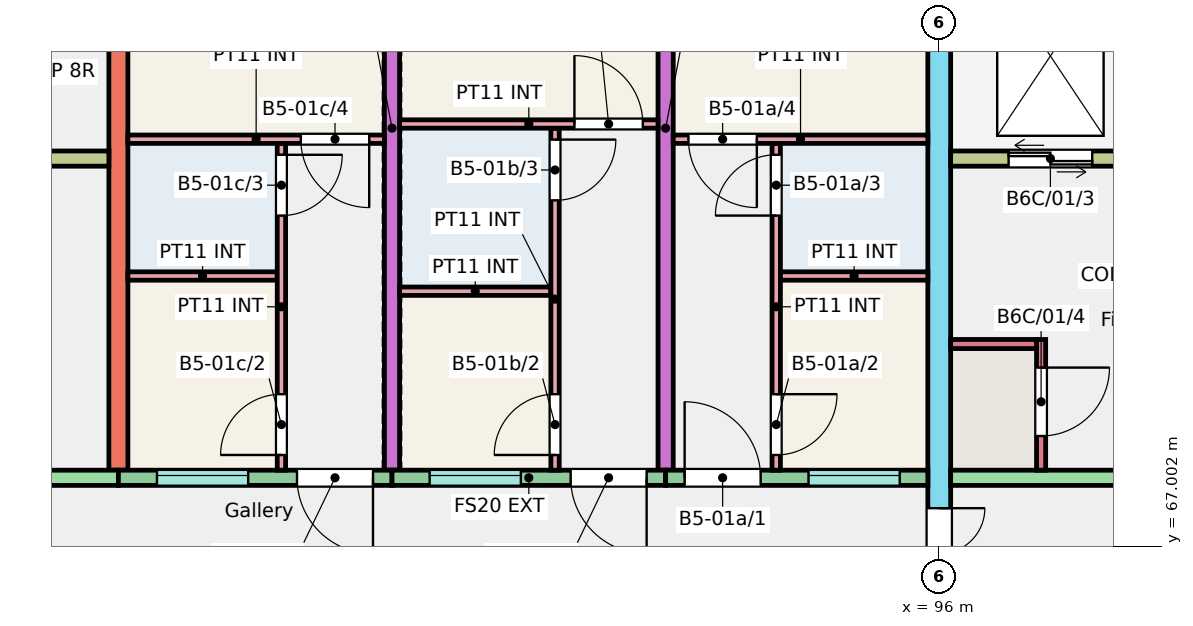
"""IFC4 building model, lengths in metres.
Left out: names, types, materials, properties, quantities, classifications, styles, units other than length and angle.
Written with IfcOpenShell. Run it as: python <this file> out.ifc"""

import sys

from ifc_helpers import new_model, si_unit, direction, frame, frame_2d, origin, place, context, subcontext, project, spatial, rectangle, extrude, element, fill, save


model = new_model("IFC4")
c1 = context("Model", 3, precision=1e-05, world=origin(), true_north=direction((0.0, 1.0)))
c2 = subcontext(c1, "Body", "Model", "MODEL_VIEW")
j1 = project(units=[si_unit("LENGTHUNIT", "METRE"), si_unit("PLANEANGLEUNIT", "RADIAN")], contexts=[c1])
p1 = place(None, origin())
s1 = spatial("IfcSite", under=j1, at=p1, CompositionType="ELEMENT")
p2 = place(p1, origin())
s2 = spatial("IfcBuilding", under=s1, at=p2, CompositionType="ELEMENT")
p3 = place(p2, frame((0.0, 0.0, 3.0)))
s3 = spatial("IfcBuildingStorey", under=s2, at=p3, CompositionType="ELEMENT", Elevation=3.0)
p4 = place(p3, frame((85.2, 68.0, 0.0), z_axis=(0.0, 0.0, 1.0), x_axis=(0.0, 1.0, 0.0)))
e1 = element("IfcWall", 1, at=p4, inside=s3, PredefinedType="SHEAR", context=c2, shape_type="SweptSolid", body=[
    extrude(rectangle(XDim=9.0, YDim=0.25, at=frame_2d((4.5, 0.0))), origin(), (0.0, 0.0, 1.0), 3.0),
])
for number, where, z_axis, x_axis in (
    (2, (88.8, 68.0, 0.0), (0.0, 0.0, 1.0), (0.0, 1.0, 0.0)),
    (3, (92.4, 68.0, 0.0), (0.0, 0.0, 1.0), (0.0, 1.0, 0.0)),
):
    element("IfcWall", number, at=place(p3, frame(where, z_axis=z_axis, x_axis=x_axis)), inside=s3, PredefinedType="SHEAR", context=c2, shape_type="SweptSolid", body=[
        extrude(rectangle(XDim=9.0, YDim=0.2, at=frame_2d((4.5, 0.0))), origin(), (0.0, 0.0, 1.0), 3.0),
    ])
p5 = place(p3, frame((96.0, 66.0, 0.0), z_axis=(0.0, 0.0, 1.0), x_axis=(0.0, 1.0, 0.0)))
e4 = element("IfcWall", 4, at=p5, inside=s3, PredefinedType="SHEAR", context=c2, shape_type="SweptSolid", body=[
    extrude(rectangle(XDim=11.0, YDim=0.3, at=frame_2d((5.5, 0.0))), origin(), (0.0, 0.0, 1.0), 3.0),
])
p6 = place(p5, frame((0.3, 0.0, 0.0)))
e5 = element("IfcOpeningElement", 5, at=p6, cuts=e4, PredefinedType="OPENING", context=c2, shape_type="SweptSolid", body=[
    extrude(rectangle(XDim=1.2, YDim=2.1, at=frame_2d((0.6, 1.05))), frame((0.0, 0.16, 0.0), z_axis=(0.0, -1.0, 0.0), x_axis=(1.0, 0.0, 0.0)), (0.0, 0.0, 1.0), 0.32),
])
p7 = place(p3, frame((79.35, 67.9, 0.0), z_axis=(0.0, 0.0, 1.0), x_axis=(1.0, 0.0, 0.0)))
e6 = element("IfcWall", 6, at=p7, inside=s3, PredefinedType="SHEAR", context=c2, shape_type="SweptSolid", body=[
    extrude(rectangle(XDim=5.85, YDim=0.2, at=frame_2d((2.925, 0.0))), origin(), (0.0, 0.0, 1.0), 3.0),
])
p8 = place(p7, frame((2.312, 0.0, 0.0)))
e7 = element("IfcOpeningElement", 7, at=p8, cuts=e6, PredefinedType="OPENING", context=c2, shape_type="SweptSolid", body=[
    extrude(rectangle(XDim=1.1, YDim=2.1, at=frame_2d((0.55, 1.05))), frame((0.0, 0.11, 0.0), z_axis=(0.0, -1.0, 0.0), x_axis=(1.0, 0.0, 0.0)), (0.0, 0.0, 1.0), 0.22),
])
p9 = place(p3, frame((79.35, 72.1, 0.0), z_axis=(0.0, 0.0, 1.0), x_axis=(1.0, 0.0, 0.0)))
e8 = element("IfcWall", 8, at=p9, inside=s3, PredefinedType="SHEAR", context=c2, shape_type="SweptSolid", body=[
    extrude(rectangle(XDim=5.725, YDim=0.2, at=frame_2d((2.862, 0.0))), origin(), (0.0, 0.0, 1.0), 3.0),
])
p10 = place(p9, frame((3.775, 0.0, 0.0)))
e9 = element("IfcOpeningElement", 9, at=p10, cuts=e8, PredefinedType="OPENING", context=c2, shape_type="SweptSolid", body=[
    extrude(rectangle(XDim=1.0, YDim=2.1, at=frame_2d((0.5, 1.05))), frame((0.0, 0.11, 0.0), z_axis=(0.0, -1.0, 0.0), x_axis=(1.0, 0.0, 0.0)), (0.0, 0.0, 1.0), 0.22),
])
p11 = place(p9, frame((0.762, 0.0, 0.0)))
e10 = element("IfcOpeningElement", 10, at=p11, cuts=e8, PredefinedType="OPENING", context=c2, shape_type="SweptSolid", body=[
    extrude(rectangle(XDim=1.1, YDim=2.1, at=frame_2d((0.55, 1.05))), frame((0.0, 0.11, 0.0), z_axis=(0.0, -1.0, 0.0), x_axis=(1.0, 0.0, 0.0)), (0.0, 0.0, 1.0), 0.22),
])
p12 = place(p3, frame((85.2, 67.9, 0.0), z_axis=(0.0, 0.0, 1.0), x_axis=(1.0, 0.0, 0.0)))
e11 = element("IfcWall", 11, at=p12, inside=s3, PredefinedType="SOLIDWALL", context=c2, shape_type="SweptSolid", body=[
    extrude(rectangle(XDim=3.6, YDim=0.2, at=frame_2d((1.8, 0.0))), origin(), (0.0, 0.0, 1.0), 3.0),
])
p13 = place(p12, frame((0.508, 0.0, 1.1)))
e12 = element("IfcOpeningElement", 12, at=p13, cuts=e11, PredefinedType="OPENING", context=c2, shape_type="SweptSolid", body=[
    extrude(rectangle(XDim=1.2, YDim=1.3, at=frame_2d((0.6, 0.65))), frame((0.0, 0.11, 0.0), z_axis=(0.0, -1.0, 0.0), x_axis=(1.0, 0.0, 0.0)), (0.0, 0.0, 1.0), 0.22),
])
p14 = place(p12, frame((2.35, 0.0, 0.0)))
e13 = element("IfcOpeningElement", 13, at=p14, cuts=e11, PredefinedType="OPENING", context=c2, shape_type="SweptSolid", body=[
    extrude(rectangle(XDim=1.0, YDim=2.1, at=frame_2d((0.5, 1.05))), frame((0.0, 0.11, 0.0), z_axis=(0.0, -1.0, 0.0), x_axis=(1.0, 0.0, 0.0)), (0.0, 0.0, 1.0), 0.22),
])
p15 = place(p3, frame((88.8, 67.9, 0.0), z_axis=(0.0, 0.0, 1.0), x_axis=(1.0, 0.0, 0.0)))
e14 = element("IfcWall", 14, at=p15, inside=s3, PredefinedType="SOLIDWALL", context=c2, shape_type="SweptSolid", body=[
    extrude(rectangle(XDim=3.6, YDim=0.2, at=frame_2d((1.8, 0.0))), origin(), (0.0, 0.0, 1.0), 3.0),
])
p16 = place(p15, frame((0.495, 0.0, 1.1)))
e15 = element("IfcOpeningElement", 15, at=p16, cuts=e14, PredefinedType="OPENING", context=c2, shape_type="SweptSolid", body=[
    extrude(rectangle(XDim=1.2, YDim=1.3, at=frame_2d((0.6, 0.65))), frame((0.0, 0.11, 0.0), z_axis=(0.0, -1.0, 0.0), x_axis=(1.0, 0.0, 0.0)), (0.0, 0.0, 1.0), 0.22),
])
p17 = place(p15, frame((2.35, 0.0, 0.0)))
e16 = element("IfcOpeningElement", 16, at=p17, cuts=e14, PredefinedType="OPENING", context=c2, shape_type="SweptSolid", body=[
    extrude(rectangle(XDim=1.0, YDim=2.1, at=frame_2d((0.5, 1.05))), frame((0.0, 0.11, 0.0), z_axis=(0.0, -1.0, 0.0), x_axis=(1.0, 0.0, 0.0)), (0.0, 0.0, 1.0), 0.22),
])
p18 = place(p3, frame((92.4, 67.9, 0.0), z_axis=(0.0, 0.0, 1.0), x_axis=(1.0, 0.0, 0.0)))
e17 = element("IfcWall", 17, at=p18, inside=s3, PredefinedType="SOLIDWALL", context=c2, shape_type="SweptSolid", body=[
    extrude(rectangle(XDim=3.45, YDim=0.2, at=frame_2d((1.725, 0.0))), origin(), (0.0, 0.0, 1.0), 3.0),
])
p19 = place(p18, frame((1.88, 0.0, 1.1)))
e18 = element("IfcOpeningElement", 18, at=p19, cuts=e17, PredefinedType="OPENING", context=c2, shape_type="SweptSolid", body=[
    extrude(rectangle(XDim=1.2, YDim=1.3, at=frame_2d((0.6, 0.65))), frame((0.0, 0.11, 0.0), z_axis=(0.0, -1.0, 0.0), x_axis=(1.0, 0.0, 0.0)), (0.0, 0.0, 1.0), 0.22),
])
p20 = place(p18, frame((0.25, 0.0, 0.0)))
e19 = element("IfcOpeningElement", 19, at=p20, cuts=e17, PredefinedType="OPENING", context=c2, shape_type="SweptSolid", body=[
    extrude(rectangle(XDim=1.0, YDim=2.1, at=frame_2d((0.5, 1.05))), frame((0.0, 0.11, 0.0), z_axis=(0.0, -1.0, 0.0), x_axis=(1.0, 0.0, 0.0)), (0.0, 0.0, 1.0), 0.22),
])
p21 = place(p3, frame((96.15, 67.9, 0.0), z_axis=(0.0, 0.0, 1.0), x_axis=(1.0, 0.0, 0.0)))
e20 = element("IfcWall", 20, at=p21, inside=s3, PredefinedType="SHEAR", context=c2, shape_type="SweptSolid", body=[
    extrude(rectangle(XDim=5.85, YDim=0.2, at=frame_2d((2.925, 0.0))), origin(), (0.0, 0.0, 1.0), 3.0),
])
p22 = place(p21, frame((2.312, 0.0, 0.0)))
e21 = element("IfcOpeningElement", 21, at=p22, cuts=e20, PredefinedType="OPENING", context=c2, shape_type="SweptSolid", body=[
    extrude(rectangle(XDim=1.1, YDim=2.1, at=frame_2d((0.55, 1.05))), frame((0.0, 0.11, 0.0), z_axis=(0.0, -1.0, 0.0), x_axis=(1.0, 0.0, 0.0)), (0.0, 0.0, 1.0), 0.22),
])
p23 = place(p3, frame((96.15, 72.1, 0.0), z_axis=(0.0, 0.0, 1.0), x_axis=(1.0, 0.0, 0.0)))
e22 = element("IfcWall", 22, at=p23, inside=s3, PredefinedType="SHEAR", context=c2, shape_type="SweptSolid", body=[
    extrude(rectangle(XDim=5.725, YDim=0.2, at=frame_2d((2.863, 0.0))), origin(), (0.0, 0.0, 1.0), 3.0),
])
p24 = place(p23, frame((3.775, 0.0, 0.0)))
e23 = element("IfcOpeningElement", 23, at=p24, cuts=e22, PredefinedType="OPENING", context=c2, shape_type="SweptSolid", body=[
    extrude(rectangle(XDim=1.0, YDim=2.1, at=frame_2d((0.5, 1.05))), frame((0.0, 0.11, 0.0), z_axis=(0.0, -1.0, 0.0), x_axis=(1.0, 0.0, 0.0)), (0.0, 0.0, 1.0), 0.22),
])
p25 = place(p23, frame((0.762, 0.0, 0.0)))
e24 = element("IfcOpeningElement", 24, at=p25, cuts=e22, PredefinedType="OPENING", context=c2, shape_type="SweptSolid", body=[
    extrude(rectangle(XDim=1.1, YDim=2.1, at=frame_2d((0.55, 1.05))), frame((0.0, 0.11, 0.0), z_axis=(0.0, -1.0, 0.0), x_axis=(1.0, 0.0, 0.0)), (0.0, 0.0, 1.0), 0.22),
])
p26 = place(p3, frame((97.34, 68.0, 0.0), z_axis=(0.0, 0.0, 1.0), x_axis=(0.0, 1.0, 0.0)))
e25 = element("IfcWall", 25, at=p26, inside=s3, PredefinedType="SHEAR", context=c2, shape_type="SweptSolid", body=[
    extrude(rectangle(XDim=1.72, YDim=0.12, at=frame_2d((0.86, 0.0))), origin(), (0.0, 0.0, 1.0), 3.0),
])
p27 = place(p26, frame((0.45, 0.0, 0.0)))
e26 = element("IfcOpeningElement", 26, at=p27, cuts=e25, PredefinedType="OPENING", context=c2, shape_type="SweptSolid", body=[
    extrude(rectangle(XDim=0.9, YDim=2.1, at=frame_2d((0.45, 1.05))), frame((0.0, 0.07, 0.0), z_axis=(0.0, -1.0, 0.0), x_axis=(1.0, 0.0, 0.0)), (0.0, 0.0, 1.0), 0.14),
])
p28 = place(p3, frame((96.15, 69.66, 0.0), z_axis=(0.0, 0.0, 1.0), x_axis=(1.0, 0.0, 0.0)))
e27 = element("IfcWall", 27, at=p28, inside=s3, PredefinedType="SHEAR", context=c2, shape_type="SweptSolid", body=[
    extrude(rectangle(XDim=1.13, YDim=0.12, at=frame_2d((0.565, 0.0))), origin(), (0.0, 0.0, 1.0), 3.0),
])
p29 = place(p3, frame((93.855, 68.0, 0.0), z_axis=(0.0, 0.0, 1.0), x_axis=(0.0, 1.0, 0.0)))
e28 = element("IfcWall", 28, at=p29, inside=s3, PredefinedType="PARTITIONING", context=c2, shape_type="SweptSolid", body=[
    extrude(rectangle(XDim=4.3, YDim=0.11, at=frame_2d((2.15, 0.0))), origin(), (0.0, 0.0, 1.0), 2.8),
])
p30 = place(p29, frame((0.2, 0.0, 0.0)))
e29 = element("IfcOpeningElement", 29, at=p30, cuts=e28, PredefinedType="OPENING", context=c2, shape_type="SweptSolid", body=[
    extrude(rectangle(XDim=0.8, YDim=2.1, at=frame_2d((0.4, 1.05))), frame((0.0, 0.065, 0.0), z_axis=(0.0, -1.0, 0.0), x_axis=(1.0, 0.0, 0.0)), (0.0, 0.0, 1.0), 0.13),
])
p31 = place(p29, frame((3.35, 0.0, 0.0)))
e30 = element("IfcOpeningElement", 30, at=p31, cuts=e28, PredefinedType="OPENING", context=c2, shape_type="SweptSolid", body=[
    extrude(rectangle(XDim=0.8, YDim=2.1, at=frame_2d((0.4, 1.05))), frame((0.0, 0.065, 0.0), z_axis=(0.0, -1.0, 0.0), x_axis=(1.0, 0.0, 0.0)), (0.0, 0.0, 1.0), 0.13),
])
p32 = place(p3, frame((93.91, 70.555, 0.0), z_axis=(0.0, 0.0, 1.0), x_axis=(1.0, 0.0, 0.0)))
e31 = element("IfcWall", 31, at=p32, inside=s3, PredefinedType="PARTITIONING", context=c2, shape_type="SweptSolid", body=[
    extrude(rectangle(XDim=1.94, YDim=0.11, at=frame_2d((0.97, 0.0))), origin(), (0.0, 0.0, 1.0), 2.8),
])
p33 = place(p3, frame((92.5, 72.355, 0.0), z_axis=(0.0, 0.0, 1.0), x_axis=(1.0, 0.0, 0.0)))
e32 = element("IfcWall", 32, at=p33, inside=s3, PredefinedType="PARTITIONING", context=c2, shape_type="SweptSolid", body=[
    extrude(rectangle(XDim=3.35, YDim=0.11, at=frame_2d((1.675, 0.0))), origin(), (0.0, 0.0, 1.0), 2.8),
])
p34 = place(p33, frame((0.2, 0.0, 0.0)))
e33 = element("IfcOpeningElement", 33, at=p34, cuts=e32, PredefinedType="OPENING", context=c2, shape_type="SweptSolid", body=[
    extrude(rectangle(XDim=0.9, YDim=2.1, at=frame_2d((0.45, 1.05))), frame((0.0, 0.065, 0.0), z_axis=(0.0, -1.0, 0.0), x_axis=(1.0, 0.0, 0.0)), (0.0, 0.0, 1.0), 0.13),
])
p35 = place(p3, frame((88.9, 70.355, 0.0), z_axis=(0.0, 0.0, 1.0), x_axis=(1.0, 0.0, 0.0)))
e34 = element("IfcWall", 34, at=p35, inside=s3, PredefinedType="PARTITIONING", context=c2, shape_type="SweptSolid", body=[
    extrude(rectangle(XDim=1.99, YDim=0.11, at=frame_2d((0.995, 0.0))), origin(), (0.0, 0.0, 1.0), 2.8),
])
p36 = place(p3, frame((90.945, 68.0, 0.0), z_axis=(0.0, 0.0, 1.0), x_axis=(0.0, 1.0, 0.0)))
e35 = element("IfcWall", 35, at=p36, inside=s3, PredefinedType="PARTITIONING", context=c2, shape_type="SweptSolid", body=[
    extrude(rectangle(XDim=4.5, YDim=0.11, at=frame_2d((2.25, 0.0))), origin(), (0.0, 0.0, 1.0), 2.8),
])
p37 = place(p36, frame((0.2, 0.0, 0.0)))
e36 = element("IfcOpeningElement", 36, at=p37, cuts=e35, PredefinedType="OPENING", context=c2, shape_type="SweptSolid", body=[
    extrude(rectangle(XDim=0.8, YDim=2.1, at=frame_2d((0.4, 1.05))), frame((0.0, 0.065, 0.0), z_axis=(0.0, -1.0, 0.0), x_axis=(1.0, 0.0, 0.0)), (0.0, 0.0, 1.0), 0.13),
])
p38 = place(p36, frame((3.55, 0.0, 0.0)))
e37 = element("IfcOpeningElement", 37, at=p38, cuts=e35, PredefinedType="OPENING", context=c2, shape_type="SweptSolid", body=[
    extrude(rectangle(XDim=0.8, YDim=2.1, at=frame_2d((0.4, 1.05))), frame((0.0, 0.065, 0.0), z_axis=(0.0, -1.0, 0.0), x_axis=(1.0, 0.0, 0.0)), (0.0, 0.0, 1.0), 0.13),
])
p39 = place(p3, frame((88.9, 72.555, 0.0), z_axis=(0.0, 0.0, 1.0), x_axis=(1.0, 0.0, 0.0)))
e38 = element("IfcWall", 38, at=p39, inside=s3, PredefinedType="PARTITIONING", context=c2, shape_type="SweptSolid", body=[
    extrude(rectangle(XDim=3.4, YDim=0.11, at=frame_2d((1.7, 0.0))), origin(), (0.0, 0.0, 1.0), 2.8),
])
p40 = place(p39, frame((2.3, 0.0, 0.0)))
e39 = element("IfcOpeningElement", 39, at=p40, cuts=e38, PredefinedType="OPENING", context=c2, shape_type="SweptSolid", body=[
    extrude(rectangle(XDim=0.9, YDim=2.1, at=frame_2d((0.45, 1.05))), frame((0.0, 0.065, 0.0), z_axis=(0.0, -1.0, 0.0), x_axis=(1.0, 0.0, 0.0)), (0.0, 0.0, 1.0), 0.13),
])
p41 = place(p3, frame((85.325, 70.555, 0.0), z_axis=(0.0, 0.0, 1.0), x_axis=(1.0, 0.0, 0.0)))
e40 = element("IfcWall", 40, at=p41, inside=s3, PredefinedType="PARTITIONING", context=c2, shape_type="SweptSolid", body=[
    extrude(rectangle(XDim=1.965, YDim=0.11, at=frame_2d((0.982, 0.0))), origin(), (0.0, 0.0, 1.0), 2.8),
])
p42 = place(p3, frame((87.345, 68.0, 0.0), z_axis=(0.0, 0.0, 1.0), x_axis=(0.0, 1.0, 0.0)))
e41 = element("IfcWall", 41, at=p42, inside=s3, PredefinedType="PARTITIONING", context=c2, shape_type="SweptSolid", body=[
    extrude(rectangle(XDim=4.3, YDim=0.11, at=frame_2d((2.15, 0.0))), origin(), (0.0, 0.0, 1.0), 2.8),
])
p43 = place(p42, frame((0.2, 0.0, 0.0)))
e42 = element("IfcOpeningElement", 42, at=p43, cuts=e41, PredefinedType="OPENING", context=c2, shape_type="SweptSolid", body=[
    extrude(rectangle(XDim=0.8, YDim=2.1, at=frame_2d((0.4, 1.05))), frame((0.0, 0.065, 0.0), z_axis=(0.0, -1.0, 0.0), x_axis=(1.0, 0.0, 0.0)), (0.0, 0.0, 1.0), 0.13),
])
p44 = place(p42, frame((3.35, 0.0, 0.0)))
e43 = element("IfcOpeningElement", 43, at=p44, cuts=e41, PredefinedType="OPENING", context=c2, shape_type="SweptSolid", body=[
    extrude(rectangle(XDim=0.8, YDim=2.1, at=frame_2d((0.4, 1.05))), frame((0.0, 0.065, 0.0), z_axis=(0.0, -1.0, 0.0), x_axis=(1.0, 0.0, 0.0)), (0.0, 0.0, 1.0), 0.13),
])
p45 = place(p3, frame((85.325, 72.355, 0.0), z_axis=(0.0, 0.0, 1.0), x_axis=(1.0, 0.0, 0.0)))
e44 = element("IfcWall", 44, at=p45, inside=s3, PredefinedType="PARTITIONING", context=c2, shape_type="SweptSolid", body=[
    extrude(rectangle(XDim=3.375, YDim=0.11, at=frame_2d((1.688, 0.0))), origin(), (0.0, 0.0, 1.0), 2.8),
])
p46 = place(p45, frame((2.275, 0.0, 0.0)))
e45 = element("IfcOpeningElement", 45, at=p46, cuts=e44, PredefinedType="OPENING", context=c2, shape_type="SweptSolid", body=[
    extrude(rectangle(XDim=0.9, YDim=2.1, at=frame_2d((0.45, 1.05))), frame((0.0, 0.065, 0.0), z_axis=(0.0, -1.0, 0.0), x_axis=(1.0, 0.0, 0.0)), (0.0, 0.0, 1.0), 0.13),
])
p47 = place(p19, origin())
e46 = element("IfcWindow", 46, at=p47, inside=s3, PartitioningType="SINGLE_PANEL", PredefinedType="WINDOW", context=c2, shape_type="SweptSolid", body=[
    extrude(rectangle(XDim=1.2, YDim=1.3, at=frame_2d((0.6, 0.65))), frame((0.0, 0.06, 0.0), z_axis=(0.0, -1.0, 0.0), x_axis=(1.0, 0.0, 0.0)), (0.0, 0.0, 1.0), 0.06),
])
fill(e18, e46)
p48 = place(p16, origin())
e47 = element("IfcWindow", 47, at=p48, inside=s3, PartitioningType="SINGLE_PANEL", PredefinedType="WINDOW", context=c2, shape_type="SweptSolid", body=[
    extrude(rectangle(XDim=1.2, YDim=1.3, at=frame_2d((0.6, 0.65))), frame((0.0, 0.06, 0.0), z_axis=(0.0, -1.0, 0.0), x_axis=(1.0, 0.0, 0.0)), (0.0, 0.0, 1.0), 0.06),
])
fill(e15, e47)
p49 = place(p13, origin())
e48 = element("IfcWindow", 48, at=p49, inside=s3, PartitioningType="SINGLE_PANEL", PredefinedType="WINDOW", context=c2, shape_type="SweptSolid", body=[
    extrude(rectangle(XDim=1.2, YDim=1.3, at=frame_2d((0.6, 0.65))), frame((0.0, 0.06, 0.0), z_axis=(0.0, -1.0, 0.0), x_axis=(1.0, 0.0, 0.0)), (0.0, 0.0, 1.0), 0.06),
])
fill(e12, e48)
p50 = place(p20, origin())
e49 = element("IfcDoor", 49, at=p50, inside=s3, OperationType="SINGLE_SWING_LEFT", PredefinedType="DOOR", context=c2, shape_type="SweptSolid", body=[
    extrude(rectangle(XDim=1.0, YDim=2.1, at=frame_2d((0.5, 1.05))), frame((0.0, 0.025, 0.0), z_axis=(0.0, -1.0, 0.0), x_axis=(1.0, 0.0, 0.0)), (0.0, 0.0, 1.0), 0.05),
])
fill(e19, e49)
p51 = place(p30, origin())
e50 = element("IfcDoor", 50, at=p51, inside=s3, OperationType="SINGLE_SWING_RIGHT", PredefinedType="DOOR", context=c2, shape_type="SweptSolid", body=[
    extrude(rectangle(XDim=0.8, YDim=2.1, at=frame_2d((0.4, 1.05))), frame((0.0, 0.025, 0.0), z_axis=(0.0, -1.0, 0.0), x_axis=(1.0, 0.0, 0.0)), (0.0, 0.0, 1.0), 0.05),
])
fill(e29, e50)
p52 = place(p31, origin())
e51 = element("IfcDoor", 51, at=p52, inside=s3, OperationType="SINGLE_SWING_LEFT", PredefinedType="DOOR", context=c2, shape_type="SweptSolid", body=[
    extrude(rectangle(XDim=0.8, YDim=2.1, at=frame_2d((0.4, 1.05))), frame((0.0, 0.025, 0.0), z_axis=(0.0, -1.0, 0.0), x_axis=(1.0, 0.0, 0.0)), (0.0, 0.0, 1.0), 0.05),
])
fill(e30, e51)
p53 = place(p34, origin())
e52 = element("IfcDoor", 52, at=p53, inside=s3, OperationType="SINGLE_SWING_RIGHT", PredefinedType="DOOR", context=c2, shape_type="SweptSolid", body=[
    extrude(rectangle(XDim=0.9, YDim=2.1, at=frame_2d((0.45, 1.05))), frame((0.0, 0.025, 0.0), z_axis=(0.0, -1.0, 0.0), x_axis=(1.0, 0.0, 0.0)), (0.0, 0.0, 1.0), 0.05),
])
fill(e33, e52)
p54 = place(p17, origin())
e53 = element("IfcDoor", 53, at=p54, inside=s3, OperationType="SINGLE_SWING_RIGHT", PredefinedType="DOOR", context=c2, shape_type="SweptSolid", body=[
    extrude(rectangle(XDim=1.0, YDim=2.1, at=frame_2d((0.5, 1.05))), frame((0.0, 0.025, 0.0), z_axis=(0.0, -1.0, 0.0), x_axis=(1.0, 0.0, 0.0)), (0.0, 0.0, 1.0), 0.05),
])
fill(e16, e53)
p55 = place(p37, origin())
e54 = element("IfcDoor", 54, at=p55, inside=s3, OperationType="SINGLE_SWING_LEFT", PredefinedType="DOOR", context=c2, shape_type="SweptSolid", body=[
    extrude(rectangle(XDim=0.8, YDim=2.1, at=frame_2d((0.4, 1.05))), frame((0.0, 0.025, 0.0), z_axis=(0.0, -1.0, 0.0), x_axis=(1.0, 0.0, 0.0)), (0.0, 0.0, 1.0), 0.05),
])
fill(e36, e54)
p56 = place(p38, origin())
e55 = element("IfcDoor", 55, at=p56, inside=s3, OperationType="SINGLE_SWING_RIGHT", PredefinedType="DOOR", context=c2, shape_type="SweptSolid", body=[
    extrude(rectangle(XDim=0.8, YDim=2.1, at=frame_2d((0.4, 1.05))), frame((0.0, 0.025, 0.0), z_axis=(0.0, -1.0, 0.0), x_axis=(1.0, 0.0, 0.0)), (0.0, 0.0, 1.0), 0.05),
])
fill(e37, e55)
p57 = place(p40, origin())
e56 = element("IfcDoor", 56, at=p57, inside=s3, OperationType="SINGLE_SWING_LEFT", PredefinedType="DOOR", context=c2, shape_type="SweptSolid", body=[
    extrude(rectangle(XDim=0.9, YDim=2.1, at=frame_2d((0.45, 1.05))), frame((0.0, 0.025, 0.0), z_axis=(0.0, -1.0, 0.0), x_axis=(1.0, 0.0, 0.0)), (0.0, 0.0, 1.0), 0.05),
])
fill(e39, e56)
p58 = place(p14, origin())
e57 = element("IfcDoor", 57, at=p58, inside=s3, OperationType="SINGLE_SWING_RIGHT", PredefinedType="DOOR", context=c2, shape_type="SweptSolid", body=[
    extrude(rectangle(XDim=1.0, YDim=2.1, at=frame_2d((0.5, 1.05))), frame((0.0, 0.025, 0.0), z_axis=(0.0, -1.0, 0.0), x_axis=(1.0, 0.0, 0.0)), (0.0, 0.0, 1.0), 0.05),
])
fill(e13, e57)
p59 = place(p43, origin())
e58 = element("IfcDoor", 58, at=p59, inside=s3, OperationType="SINGLE_SWING_LEFT", PredefinedType="DOOR", context=c2, shape_type="SweptSolid", body=[
    extrude(rectangle(XDim=0.8, YDim=2.1, at=frame_2d((0.4, 1.05))), frame((0.0, 0.025, 0.0), z_axis=(0.0, -1.0, 0.0), x_axis=(1.0, 0.0, 0.0)), (0.0, 0.0, 1.0), 0.05),
])
fill(e42, e58)
p60 = place(p44, origin())
e59 = element("IfcDoor", 59, at=p60, inside=s3, OperationType="SINGLE_SWING_RIGHT", PredefinedType="DOOR", context=c2, shape_type="SweptSolid", body=[
    extrude(rectangle(XDim=0.8, YDim=2.1, at=frame_2d((0.4, 1.05))), frame((0.0, 0.025, 0.0), z_axis=(0.0, -1.0, 0.0), x_axis=(1.0, 0.0, 0.0)), (0.0, 0.0, 1.0), 0.05),
])
fill(e43, e59)
p61 = place(p46, origin())
e60 = element("IfcDoor", 60, at=p61, inside=s3, OperationType="SINGLE_SWING_RIGHT", PredefinedType="DOOR", context=c2, shape_type="SweptSolid", body=[
    extrude(rectangle(XDim=0.9, YDim=2.1, at=frame_2d((0.45, 1.05))), frame((0.0, 0.025, 0.0), z_axis=(0.0, -1.0, 0.0), x_axis=(1.0, 0.0, 0.0)), (0.0, 0.0, 1.0), 0.05),
])
fill(e45, e60)
p62 = place(p25, origin())
e61 = element("IfcDoor", 61, at=p62, inside=s3, OperationType="DOUBLE_DOOR_SLIDING", PredefinedType="DOOR", context=c2, shape_type="SweptSolid", body=[
    extrude(rectangle(XDim=1.1, YDim=2.1, at=frame_2d((0.55, 1.05))), frame((0.0, 0.025, 0.0), z_axis=(0.0, -1.0, 0.0), x_axis=(1.0, 0.0, 0.0)), (0.0, 0.0, 1.0), 0.05),
])
fill(e24, e61)
p63 = place(p27, origin())
e62 = element("IfcDoor", 62, at=p63, inside=s3, OperationType="SINGLE_SWING_RIGHT", PredefinedType="DOOR", context=c2, shape_type="SweptSolid", body=[
    extrude(rectangle(XDim=0.9, YDim=2.1, at=frame_2d((0.45, 1.05))), frame((0.0, 0.025, 0.0), z_axis=(0.0, -1.0, 0.0), x_axis=(1.0, 0.0, 0.0)), (0.0, 0.0, 1.0), 0.05),
])
fill(e26, e62)
p64 = place(p6, origin())
e63 = element("IfcDoor", 63, at=p64, inside=s3, OperationType="DOUBLE_DOOR_SINGLE_SWING", PredefinedType="DOOR", context=c2, shape_type="SweptSolid", body=[
    extrude(rectangle(XDim=1.2, YDim=2.1, at=frame_2d((0.6, 1.05))), frame((0.0, 0.025, 0.0), z_axis=(0.0, -1.0, 0.0), x_axis=(1.0, 0.0, 0.0)), (0.0, 0.0, 1.0), 0.05),
])
fill(e5, e63)
save(model, sys.argv[1])
